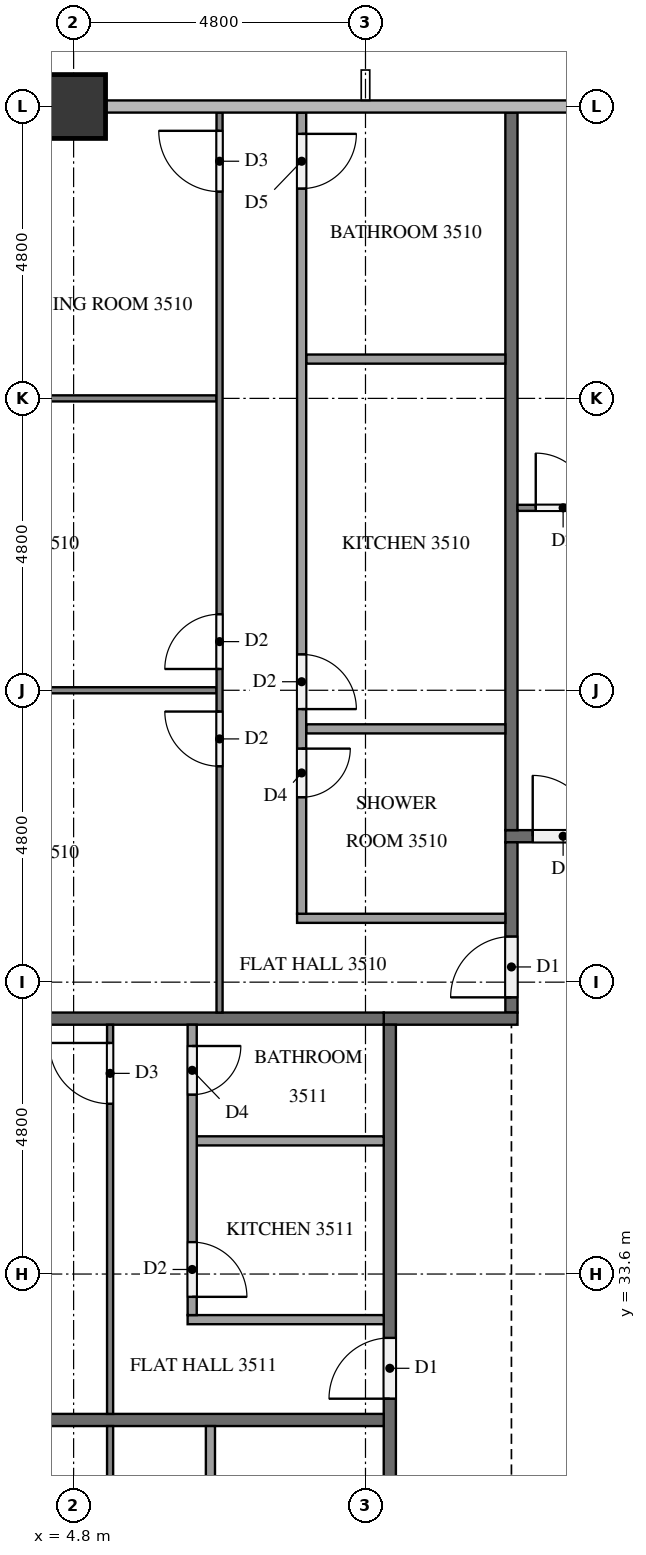
"""IFC4 building model, lengths in metres.
Left out: names, types, materials, properties, quantities, classifications, styles, units other than length and angle.
Written with IfcOpenShell. Run it as: python <this file> out.ifc"""

import sys

from ifc_helpers import new_model, si_unit, direction, frame, frame_2d, origin, origin_2d, place, context, subcontext, project, spatial, rectangle, extrude, element, fill, save


model = new_model("IFC4")
c1 = context("Model", 3, precision=1e-05, world=origin(), true_north=direction((0.0, 1.0)))
c2 = subcontext(c1, "Body", "Model", "MODEL_VIEW")
j1 = project(units=[si_unit("LENGTHUNIT", "METRE"), si_unit("PLANEANGLEUNIT", "RADIAN")], contexts=[c1])
p1 = place(None, origin())
s1 = spatial("IfcSite", under=j1, at=p1, CompositionType="ELEMENT")
p2 = place(p1, origin())
s2 = spatial("IfcBuilding", under=s1, at=p2, CompositionType="ELEMENT")
p3 = place(p2, frame((0.0, 0.0, 136.6)))
s3 = spatial("IfcBuildingStorey", under=s2, at=p3, CompositionType="ELEMENT", Elevation=136.6)
p4 = place(p3, frame((4.8, 52.8, 0.0), z_axis=(0.0, 0.0, 1.0), x_axis=(1.0, 0.0, 0.0)))
e1 = element("IfcColumn", 1, at=p4, inside=s3, PredefinedType="COLUMN", context=c2, shape_type="SweptSolid", body=[
    extrude(rectangle(XDim=1.05, YDim=1.05, at=origin_2d()), origin(), (0.0, 0.0, 1.0), 3.2),
])
p5 = place(p3, frame((11.9, 40.8, 0.0), z_axis=(0.0, 0.0, 1.0), x_axis=(1.0, 0.0, 0.0)))
e2 = element("IfcWall", 2, at=p5, inside=s3, PredefinedType="PARTITIONING", context=c2, shape_type="SweptSolid", body=[
    extrude(rectangle(XDim=38.6, YDim=0.2, at=frame_2d((19.3, 0.0))), origin(), (0.0, 0.0, 1.0), 3.2),
])
p6 = place(p5, frame((37.15, 0.0, 0.0)))
e3 = element("IfcOpeningElement", 3, at=p6, cuts=e2, PredefinedType="OPENING", context=c2, shape_type="SweptSolid", body=[
    extrude(rectangle(XDim=1.0, YDim=2.1, at=frame_2d((0.5, 1.05))), frame((0.0, 0.11, 0.0), z_axis=(0.0, -1.0, 0.0), x_axis=(1.0, 0.0, 0.0)), (0.0, 0.0, 1.0), 0.22),
])
p7 = place(p5, frame((10.05, 0.0, 0.0)))
e4 = element("IfcOpeningElement", 4, at=p7, cuts=e2, PredefinedType="OPENING", context=c2, shape_type="SweptSolid", body=[
    extrude(rectangle(XDim=1.0, YDim=2.1, at=frame_2d((0.5, 1.05))), frame((0.0, 0.11, 0.0), z_axis=(0.0, -1.0, 0.0), x_axis=(1.0, 0.0, 0.0)), (0.0, 0.0, 1.0), 0.22),
])
p8 = place(p5, frame((0.45, 0.0, 0.0)))
e5 = element("IfcOpeningElement", 5, at=p8, cuts=e2, PredefinedType="OPENING", context=c2, shape_type="SweptSolid", body=[
    extrude(rectangle(XDim=1.0, YDim=2.1, at=frame_2d((0.5, 1.05))), frame((0.0, 0.11, 0.0), z_axis=(0.0, -1.0, 0.0), x_axis=(1.0, 0.0, 0.0)), (0.0, 0.0, 1.0), 0.22),
])
p9 = place(p3, frame((12.0, 37.9, 0.0), z_axis=(0.0, 0.0, 1.0), x_axis=(0.0, 1.0, 0.0)))
e6 = element("IfcWall", 6, at=p9, inside=s3, PredefinedType="PARTITIONING", context=c2, shape_type="SweptSolid", body=[
    extrude(rectangle(XDim=2.8, YDim=0.2, at=frame_2d((1.4, 0.0))), origin(), (0.0, 0.0, 1.0), 3.2),
])
p10 = place(p9, frame((0.25, 0.0, 0.0)))
e7 = element("IfcOpeningElement", 7, at=p10, cuts=e6, PredefinedType="OPENING", context=c2, shape_type="SweptSolid", body=[
    extrude(rectangle(XDim=1.0, YDim=2.1, at=frame_2d((0.5, 1.05))), frame((0.0, 0.11, 0.0), z_axis=(0.0, -1.0, 0.0), x_axis=(1.0, 0.0, 0.0)), (0.0, 0.0, 1.0), 0.22),
])
p11 = place(p3, frame((12.1, 37.8, 0.0), z_axis=(0.0, 0.0, 1.0), x_axis=(-1.0, 0.0, 0.0)))
e8 = element("IfcWall", 8, at=p11, inside=s3, PredefinedType="PARTITIONING", context=c2, shape_type="SweptSolid", body=[
    extrude(rectangle(XDim=2.2, YDim=0.2, at=frame_2d((1.1, 0.0))), origin(), (0.0, 0.0, 1.0), 3.2),
])
p12 = place(p3, frame((10.0, 15.1, 0.0), z_axis=(0.0, 0.0, 1.0), x_axis=(0.0, 1.0, 0.0)))
e9 = element("IfcWall", 9, at=p12, inside=s3, PredefinedType="PARTITIONING", context=c2, shape_type="SweptSolid", body=[
    extrude(rectangle(XDim=22.6, YDim=0.2, at=frame_2d((11.3, 0.0))), origin(), (0.0, 0.0, 1.0), 3.2),
])
p13 = place(p12, frame((16.45, 0.0, 0.0)))
e10 = element("IfcOpeningElement", 10, at=p13, cuts=e9, PredefinedType="OPENING", context=c2, shape_type="SweptSolid", body=[
    extrude(rectangle(XDim=1.0, YDim=2.1, at=frame_2d((0.5, 1.05))), frame((0.0, 0.11, 0.0), z_axis=(0.0, -1.0, 0.0), x_axis=(1.0, 0.0, 0.0)), (0.0, 0.0, 1.0), 0.22),
])
p14 = place(p12, frame((0.25, 0.0, 0.0)))
e11 = element("IfcOpeningElement", 11, at=p14, cuts=e9, PredefinedType="OPENING", context=c2, shape_type="SweptSolid", body=[
    extrude(rectangle(XDim=1.0, YDim=2.1, at=frame_2d((0.5, 1.05))), frame((0.0, 0.11, 0.0), z_axis=(0.0, -1.0, 0.0), x_axis=(1.0, 0.0, 0.0)), (0.0, 0.0, 1.0), 0.22),
])
p15 = place(p3, frame((12.0, 52.7, 0.0), z_axis=(0.0, 0.0, 1.0), x_axis=(0.0, -1.0, 0.0)))
e12 = element("IfcWall", 12, at=p15, inside=s3, PredefinedType="PARTITIONING", context=c2, shape_type="SweptSolid", body=[
    extrude(rectangle(XDim=11.8, YDim=0.2, at=frame_2d((5.9, 0.0))), origin(), (0.0, 0.0, 1.0), 3.2),
])
p16 = place(p3, frame((0.375, 37.8, 0.0), z_axis=(0.0, 0.0, 1.0), x_axis=(1.0, 0.0, 0.0)))
e13 = element("IfcWall", 13, at=p16, inside=s3, PredefinedType="PARTITIONING", context=c2, shape_type="SweptSolid", body=[
    extrude(rectangle(XDim=9.525, YDim=0.2, at=frame_2d((4.762, 0.0))), origin(), (0.0, 0.0, 1.0), 3.2),
])
p17 = place(p3, frame((0.1, 31.2, 0.0), z_axis=(0.0, 0.0, 1.0), x_axis=(1.0, 0.0, 0.0)))
e14 = element("IfcWall", 14, at=p17, inside=s3, PredefinedType="PARTITIONING", context=c2, shape_type="SweptSolid", body=[
    extrude(rectangle(XDim=9.8, YDim=0.2, at=frame_2d((4.9, 0.0))), origin(), (0.0, 0.0, 1.0), 3.2),
])
p18 = place(p3, frame((12.1, 46.2, 0.0), z_axis=(0.0, 0.0, 1.0), x_axis=(1.0, 0.0, 0.0)))
e15 = element("IfcWall", 15, at=p18, inside=s3, PredefinedType="PARTITIONING", context=c2, shape_type="SweptSolid", body=[
    extrude(rectangle(XDim=9.4, YDim=0.1, at=frame_2d((4.7, 0.0))), origin(), (0.0, 0.0, 1.0), 3.2),
])
p19 = place(p18, frame((0.3, 0.0, 0.0)))
e16 = element("IfcOpeningElement", 16, at=p19, cuts=e15, PredefinedType="OPENING", context=c2, shape_type="SweptSolid", body=[
    extrude(rectangle(XDim=0.9, YDim=2.1, at=frame_2d((0.45, 1.05))), frame((0.0, 0.06, 0.0), z_axis=(0.0, -1.0, 0.0), x_axis=(1.0, 0.0, 0.0)), (0.0, 0.0, 1.0), 0.12),
])
p20 = place(p18, frame((8.1, 0.0, 0.0)))
e17 = element("IfcOpeningElement", 17, at=p20, cuts=e15, PredefinedType="OPENING", context=c2, shape_type="SweptSolid", body=[
    extrude(rectangle(XDim=1.0, YDim=2.1, at=frame_2d((0.5, 1.05))), frame((0.0, 0.06, 0.0), z_axis=(0.0, -1.0, 0.0), x_axis=(1.0, 0.0, 0.0)), (0.0, 0.0, 1.0), 0.12),
])
p21 = place(p3, frame((7.15, 43.2, 0.0), z_axis=(0.0, 0.0, 1.0), x_axis=(-1.0, 0.0, 0.0)))
e18 = element("IfcWall", 18, at=p21, inside=s3, PredefinedType="PARTITIONING", context=c2, shape_type="SweptSolid", body=[
    extrude(rectangle(XDim=7.05, YDim=0.1, at=frame_2d((3.525, 0.0))), origin(), (0.0, 0.0, 1.0), 3.2),
])
p22 = place(p3, frame((7.15, 48.0, 0.0), z_axis=(0.0, 0.0, 1.0), x_axis=(-1.0, 0.0, 0.0)))
e19 = element("IfcWall", 19, at=p22, inside=s3, PredefinedType="PARTITIONING", context=c2, shape_type="SweptSolid", body=[
    extrude(rectangle(XDim=6.625, YDim=0.1, at=frame_2d((3.312, 0.0))), origin(), (0.0, 0.0, 1.0), 3.2),
])
p23 = place(p3, frame((7.2, 37.9, 0.0), z_axis=(0.0, 0.0, 1.0), x_axis=(0.0, 1.0, 0.0)))
e20 = element("IfcWall", 20, at=p23, inside=s3, PredefinedType="PARTITIONING", context=c2, shape_type="SweptSolid", body=[
    extrude(rectangle(XDim=14.8, YDim=0.1, at=frame_2d((7.4, 0.0))), origin(), (0.0, 0.0, 1.0), 3.2),
])
p24 = place(p23, frame((4.05, 0.0, 0.0)))
e21 = element("IfcOpeningElement", 21, at=p24, cuts=e20, PredefinedType="OPENING", context=c2, shape_type="SweptSolid", body=[
    extrude(rectangle(XDim=0.9, YDim=2.1, at=frame_2d((0.45, 1.05))), frame((0.0, 0.06, 0.0), z_axis=(0.0, -1.0, 0.0), x_axis=(1.0, 0.0, 0.0)), (0.0, 0.0, 1.0), 0.12),
])
p25 = place(p23, frame((5.65, 0.0, 0.0)))
e22 = element("IfcOpeningElement", 22, at=p25, cuts=e20, PredefinedType="OPENING", context=c2, shape_type="SweptSolid", body=[
    extrude(rectangle(XDim=0.9, YDim=2.1, at=frame_2d((0.45, 1.05))), frame((0.0, 0.06, 0.0), z_axis=(0.0, -1.0, 0.0), x_axis=(1.0, 0.0, 0.0)), (0.0, 0.0, 1.0), 0.12),
])
p26 = place(p23, frame((13.5, 0.0, 0.0)))
e23 = element("IfcOpeningElement", 23, at=p26, cuts=e20, PredefinedType="OPENING", context=c2, shape_type="SweptSolid", body=[
    extrude(rectangle(XDim=1.0, YDim=2.1, at=frame_2d((0.5, 1.05))), frame((0.0, 0.06, 0.0), z_axis=(0.0, -1.0, 0.0), x_axis=(1.0, 0.0, 0.0)), (0.0, 0.0, 1.0), 0.12),
])
for number, where, z_axis, x_axis in (
    (24, (11.9, 42.565, 0.0), (0.0, 0.0, 1.0), (-1.0, 0.0, 0.0)),
    (25, (11.9, 48.646, 0.0), (0.0, 0.0, 1.0), (-1.0, 0.0, 0.0)),
):
    element("IfcWall", number, at=place(p3, frame(where, z_axis=z_axis, x_axis=x_axis)), inside=s3, PredefinedType="PARTITIONING", context=c2, shape_type="SweptSolid", body=[
        extrude(rectangle(XDim=3.275, YDim=0.15, at=frame_2d((1.637, 0.0))), origin(), (0.0, 0.0, 1.0), 3.2),
    ])
p27 = place(p3, frame((11.9, 39.45, 0.0), z_axis=(0.0, 0.0, 1.0), x_axis=(-1.0, 0.0, 0.0)))
e26 = element("IfcWall", 26, at=p27, inside=s3, PredefinedType="PARTITIONING", context=c2, shape_type="SweptSolid", body=[
    extrude(rectangle(XDim=3.425, YDim=0.15, at=frame_2d((1.712, 0.0))), origin(), (0.0, 0.0, 1.0), 3.2),
])
p28 = place(p3, frame((8.55, 52.7, 0.0), z_axis=(0.0, 0.0, 1.0), x_axis=(0.0, -1.0, 0.0)))
e27 = element("IfcWall", 27, at=p28, inside=s3, PredefinedType="PARTITIONING", context=c2, shape_type="SweptSolid", body=[
    extrude(rectangle(XDim=13.175, YDim=0.15, at=frame_2d((6.587, 0.0))), origin(), (0.0, 0.0, 1.0), 3.2),
])
p29 = place(p28, frame((10.46, 0.0, 0.0)))
e28 = element("IfcOpeningElement", 28, at=p29, cuts=e27, PredefinedType="OPENING", context=c2, shape_type="SweptSolid", body=[
    extrude(rectangle(XDim=0.8, YDim=2.1, at=frame_2d((0.4, 1.05))), frame((0.0, 0.085, 0.0), z_axis=(0.0, -1.0, 0.0), x_axis=(1.0, 0.0, 0.0)), (0.0, 0.0, 1.0), 0.17),
])
p30 = place(p28, frame((8.91, 0.0, 0.0)))
e29 = element("IfcOpeningElement", 29, at=p30, cuts=e27, PredefinedType="OPENING", context=c2, shape_type="SweptSolid", body=[
    extrude(rectangle(XDim=0.9, YDim=2.1, at=frame_2d((0.45, 1.05))), frame((0.0, 0.085, 0.0), z_axis=(0.0, -1.0, 0.0), x_axis=(1.0, 0.0, 0.0)), (0.0, 0.0, 1.0), 0.17),
])
p31 = place(p28, frame((0.35, 0.0, 0.0)))
e30 = element("IfcOpeningElement", 30, at=p31, cuts=e27, PredefinedType="OPENING", context=c2, shape_type="SweptSolid", body=[
    extrude(rectangle(XDim=0.9, YDim=2.1, at=frame_2d((0.45, 1.05))), frame((0.0, 0.085, 0.0), z_axis=(0.0, -1.0, 0.0), x_axis=(1.0, 0.0, 0.0)), (0.0, 0.0, 1.0), 0.17),
])
p32 = place(p3, frame((5.4, 31.3, 0.0), z_axis=(0.0, 0.0, 1.0), x_axis=(0.0, 1.0, 0.0)))
e31 = element("IfcWall", 31, at=p32, inside=s3, PredefinedType="PARTITIONING", context=c2, shape_type="SweptSolid", body=[
    extrude(rectangle(XDim=6.4, YDim=0.1, at=frame_2d((3.2, 0.0))), origin(), (0.0, 0.0, 1.0), 3.2),
])
p33 = place(p32, frame((5.1, 0.0, 0.0)))
e32 = element("IfcOpeningElement", 32, at=p33, cuts=e31, PredefinedType="OPENING", context=c2, shape_type="SweptSolid", body=[
    extrude(rectangle(XDim=1.0, YDim=2.1, at=frame_2d((0.5, 1.05))), frame((0.0, 0.06, 0.0), z_axis=(0.0, -1.0, 0.0), x_axis=(1.0, 0.0, 0.0)), (0.0, 0.0, 1.0), 0.12),
])
p34 = place(p3, frame((9.9, 35.79, 0.0), z_axis=(0.0, 0.0, 1.0), x_axis=(-1.0, 0.0, 0.0)))
e33 = element("IfcWall", 33, at=p34, inside=s3, PredefinedType="PARTITIONING", context=c2, shape_type="SweptSolid", body=[
    extrude(rectangle(XDim=3.075, YDim=0.15, at=frame_2d((1.538, 0.0))), origin(), (0.0, 0.0, 1.0), 3.2),
])
p35 = place(p3, frame((9.9, 32.85, 0.0), z_axis=(0.0, 0.0, 1.0), x_axis=(-1.0, 0.0, 0.0)))
e34 = element("IfcWall", 34, at=p35, inside=s3, PredefinedType="PARTITIONING", context=c2, shape_type="SweptSolid", body=[
    extrude(rectangle(XDim=3.225, YDim=0.15, at=frame_2d((1.612, 0.0))), origin(), (0.0, 0.0, 1.0), 3.2),
])
p36 = place(p3, frame((6.75, 37.7, 0.0), z_axis=(0.0, 0.0, 1.0), x_axis=(0.0, -1.0, 0.0)))
e35 = element("IfcWall", 35, at=p36, inside=s3, PredefinedType="PARTITIONING", context=c2, shape_type="SweptSolid", body=[
    extrude(rectangle(XDim=4.775, YDim=0.15, at=frame_2d((2.387, 0.0))), origin(), (0.0, 0.0, 1.0), 3.2),
])
p37 = place(p36, frame((3.575, 0.0, 0.0)))
e36 = element("IfcOpeningElement", 36, at=p37, cuts=e35, PredefinedType="OPENING", context=c2, shape_type="SweptSolid", body=[
    extrude(rectangle(XDim=0.9, YDim=2.1, at=frame_2d((0.45, 1.05))), frame((0.0, 0.085, 0.0), z_axis=(0.0, -1.0, 0.0), x_axis=(1.0, 0.0, 0.0)), (0.0, 0.0, 1.0), 0.17),
])
p38 = place(p36, frame((0.35, 0.0, 0.0)))
e37 = element("IfcOpeningElement", 37, at=p38, cuts=e35, PredefinedType="OPENING", context=c2, shape_type="SweptSolid", body=[
    extrude(rectangle(XDim=0.8, YDim=2.1, at=frame_2d((0.4, 1.05))), frame((0.0, 0.085, 0.0), z_axis=(0.0, -1.0, 0.0), x_axis=(1.0, 0.0, 0.0)), (0.0, 0.0, 1.0), 0.17),
])
p39 = place(p3, frame((5.4, 15.1, 0.0), z_axis=(0.0, 0.0, 1.0), x_axis=(0.0, 1.0, 0.0)))
e38 = element("IfcWall", 38, at=p39, inside=s3, PredefinedType="PARTITIONING", context=c2, shape_type="SweptSolid", body=[
    extrude(rectangle(XDim=16.0, YDim=0.1, at=frame_2d((8.0, 0.0))), origin(), (0.0, 0.0, 1.0), 3.2),
])
p40 = place(p39, frame((0.3, 0.0, 0.0)))
e39 = element("IfcOpeningElement", 39, at=p40, cuts=e38, PredefinedType="OPENING", context=c2, shape_type="SweptSolid", body=[
    extrude(rectangle(XDim=1.0, YDim=2.1, at=frame_2d((0.5, 1.05))), frame((0.0, 0.06, 0.0), z_axis=(0.0, -1.0, 0.0), x_axis=(1.0, 0.0, 0.0)), (0.0, 0.0, 1.0), 0.12),
])
p41 = place(p39, frame((10.05, 0.0, 0.0)))
e40 = element("IfcOpeningElement", 40, at=p41, cuts=e38, PredefinedType="OPENING", context=c2, shape_type="SweptSolid", body=[
    extrude(rectangle(XDim=0.9, YDim=2.1, at=frame_2d((0.45, 1.05))), frame((0.0, 0.06, 0.0), z_axis=(0.0, -1.0, 0.0), x_axis=(1.0, 0.0, 0.0)), (0.0, 0.0, 1.0), 0.12),
])
p42 = place(p39, frame((11.65, 0.0, 0.0)))
e41 = element("IfcOpeningElement", 41, at=p42, cuts=e38, PredefinedType="OPENING", context=c2, shape_type="SweptSolid", body=[
    extrude(rectangle(XDim=0.9, YDim=2.1, at=frame_2d((0.45, 1.05))), frame((0.0, 0.06, 0.0), z_axis=(0.0, -1.0, 0.0), x_axis=(1.0, 0.0, 0.0)), (0.0, 0.0, 1.0), 0.12),
])
p43 = place(p3, frame((7.05, 31.1, 0.0), z_axis=(0.0, 0.0, 1.0), x_axis=(0.0, -1.0, 0.0)))
e42 = element("IfcWall", 42, at=p43, inside=s3, PredefinedType="PARTITIONING", context=c2, shape_type="SweptSolid", body=[
    extrude(rectangle(XDim=14.375, YDim=0.15, at=frame_2d((7.188, 0.0))), origin(), (0.0, 0.0, 1.0), 3.2),
])
p44 = place(p43, frame((13.175, 0.0, 0.0)))
e43 = element("IfcOpeningElement", 43, at=p44, cuts=e42, PredefinedType="OPENING", context=c2, shape_type="SweptSolid", body=[
    extrude(rectangle(XDim=0.9, YDim=2.1, at=frame_2d((0.45, 1.05))), frame((0.0, 0.085, 0.0), z_axis=(0.0, -1.0, 0.0), x_axis=(1.0, 0.0, 0.0)), (0.0, 0.0, 1.0), 0.17),
])
p45 = place(p43, frame((3.642, 0.0, 0.0)))
e44 = element("IfcOpeningElement", 44, at=p45, cuts=e42, PredefinedType="OPENING", context=c2, shape_type="SweptSolid", body=[
    extrude(rectangle(XDim=0.9, YDim=2.1, at=frame_2d((0.45, 1.05))), frame((0.0, 0.085, 0.0), z_axis=(0.0, -1.0, 0.0), x_axis=(1.0, 0.0, 0.0)), (0.0, 0.0, 1.0), 0.17),
])
p46 = place(p43, frame((2.192, 0.0, 0.0)))
e45 = element("IfcOpeningElement", 45, at=p46, cuts=e42, PredefinedType="OPENING", context=c2, shape_type="SweptSolid", body=[
    extrude(rectangle(XDim=0.8, YDim=2.1, at=frame_2d((0.4, 1.05))), frame((0.0, 0.085, 0.0), z_axis=(0.0, -1.0, 0.0), x_axis=(1.0, 0.0, 0.0)), (0.0, 0.0, 1.0), 0.17),
])
p47 = place(p8, origin())
e46 = element("IfcDoor", 46, at=p47, inside=s3, OperationType="SINGLE_SWING_LEFT", PredefinedType="DOOR", context=c2, shape_type="SweptSolid", body=[
    extrude(rectangle(XDim=1.0, YDim=2.1, at=frame_2d((0.5, 1.05))), frame((0.0, 0.025, 0.0), z_axis=(0.0, -1.0, 0.0), x_axis=(1.0, 0.0, 0.0)), (0.0, 0.0, 1.0), 0.05),
])
fill(e5, e46)
p48 = place(p10, origin())
e47 = element("IfcDoor", 47, at=p48, inside=s3, OperationType="SINGLE_SWING_LEFT", PredefinedType="DOOR", context=c2, shape_type="SweptSolid", body=[
    extrude(rectangle(XDim=1.0, YDim=2.1, at=frame_2d((0.5, 1.05))), frame((0.0, 0.025, 0.0), z_axis=(0.0, -1.0, 0.0), x_axis=(1.0, 0.0, 0.0)), (0.0, 0.0, 1.0), 0.05),
])
fill(e7, e47)
p49 = place(p13, origin())
e48 = element("IfcDoor", 48, at=p49, inside=s3, OperationType="SINGLE_SWING_LEFT", PredefinedType="DOOR", context=c2, shape_type="SweptSolid", body=[
    extrude(rectangle(XDim=1.0, YDim=2.1, at=frame_2d((0.5, 1.05))), frame((0.0, 0.025, 0.0), z_axis=(0.0, -1.0, 0.0), x_axis=(1.0, 0.0, 0.0)), (0.0, 0.0, 1.0), 0.05),
])
fill(e10, e48)
p50 = place(p19, origin())
e49 = element("IfcDoor", 49, at=p50, inside=s3, OperationType="SINGLE_SWING_LEFT", PredefinedType="DOOR", context=c2, shape_type="SweptSolid", body=[
    extrude(rectangle(XDim=0.9, YDim=2.1, at=frame_2d((0.45, 1.05))), frame((0.0, 0.025, 0.0), z_axis=(0.0, -1.0, 0.0), x_axis=(1.0, 0.0, 0.0)), (0.0, 0.0, 1.0), 0.05),
])
fill(e16, e49)
p51 = place(p24, origin())
e50 = element("IfcDoor", 50, at=p51, inside=s3, OperationType="SINGLE_SWING_RIGHT", PredefinedType="DOOR", context=c2, shape_type="SweptSolid", body=[
    extrude(rectangle(XDim=0.9, YDim=2.1, at=frame_2d((0.45, 1.05))), frame((0.0, 0.025, 0.0), z_axis=(0.0, -1.0, 0.0), x_axis=(1.0, 0.0, 0.0)), (0.0, 0.0, 1.0), 0.05),
])
fill(e21, e50)
p52 = place(p25, origin())
e51 = element("IfcDoor", 51, at=p52, inside=s3, OperationType="SINGLE_SWING_LEFT", PredefinedType="DOOR", context=c2, shape_type="SweptSolid", body=[
    extrude(rectangle(XDim=0.9, YDim=2.1, at=frame_2d((0.45, 1.05))), frame((0.0, 0.025, 0.0), z_axis=(0.0, -1.0, 0.0), x_axis=(1.0, 0.0, 0.0)), (0.0, 0.0, 1.0), 0.05),
])
fill(e22, e51)
p53 = place(p26, origin())
e52 = element("IfcDoor", 52, at=p53, inside=s3, OperationType="SINGLE_SWING_RIGHT", PredefinedType="DOOR", context=c2, shape_type="SweptSolid", body=[
    extrude(rectangle(XDim=1.0, YDim=2.1, at=frame_2d((0.5, 1.05))), frame((0.0, 0.025, 0.0), z_axis=(0.0, -1.0, 0.0), x_axis=(1.0, 0.0, 0.0)), (0.0, 0.0, 1.0), 0.05),
])
fill(e23, e52)
p54 = place(p29, origin())
e53 = element("IfcDoor", 53, at=p54, inside=s3, OperationType="SINGLE_SWING_LEFT", PredefinedType="DOOR", context=c2, shape_type="SweptSolid", body=[
    extrude(rectangle(XDim=0.8, YDim=2.1, at=frame_2d((0.4, 1.05))), frame((0.0, 0.025, 0.0), z_axis=(0.0, -1.0, 0.0), x_axis=(1.0, 0.0, 0.0)), (0.0, 0.0, 1.0), 0.05),
])
fill(e28, e53)
p55 = place(p30, origin())
e54 = element("IfcDoor", 54, at=p55, inside=s3, OperationType="SINGLE_SWING_RIGHT", PredefinedType="DOOR", context=c2, shape_type="SweptSolid", body=[
    extrude(rectangle(XDim=0.9, YDim=2.1, at=frame_2d((0.45, 1.05))), frame((0.0, 0.025, 0.0), z_axis=(0.0, -1.0, 0.0), x_axis=(1.0, 0.0, 0.0)), (0.0, 0.0, 1.0), 0.05),
])
fill(e29, e54)
p56 = place(p31, origin())
e55 = element("IfcDoor", 55, at=p56, inside=s3, OperationType="SINGLE_SWING_LEFT", PredefinedType="DOOR", context=c2, shape_type="SweptSolid", body=[
    extrude(rectangle(XDim=0.9, YDim=2.1, at=frame_2d((0.45, 1.05))), frame((0.0, 0.025, 0.0), z_axis=(0.0, -1.0, 0.0), x_axis=(1.0, 0.0, 0.0)), (0.0, 0.0, 1.0), 0.05),
])
fill(e30, e55)
p57 = place(p33, origin())
e56 = element("IfcDoor", 56, at=p57, inside=s3, OperationType="SINGLE_SWING_RIGHT", PredefinedType="DOOR", context=c2, shape_type="SweptSolid", body=[
    extrude(rectangle(XDim=1.0, YDim=2.1, at=frame_2d((0.5, 1.05))), frame((0.0, 0.025, 0.0), z_axis=(0.0, -1.0, 0.0), x_axis=(1.0, 0.0, 0.0)), (0.0, 0.0, 1.0), 0.05),
])
fill(e32, e56)
p58 = place(p37, origin())
e57 = element("IfcDoor", 57, at=p58, inside=s3, OperationType="SINGLE_SWING_RIGHT", PredefinedType="DOOR", context=c2, shape_type="SweptSolid", body=[
    extrude(rectangle(XDim=0.9, YDim=2.1, at=frame_2d((0.45, 1.05))), frame((0.0, 0.025, 0.0), z_axis=(0.0, -1.0, 0.0), x_axis=(1.0, 0.0, 0.0)), (0.0, 0.0, 1.0), 0.05),
])
fill(e36, e57)
p59 = place(p38, origin())
e58 = element("IfcDoor", 58, at=p59, inside=s3, OperationType="SINGLE_SWING_LEFT", PredefinedType="DOOR", context=c2, shape_type="SweptSolid", body=[
    extrude(rectangle(XDim=0.8, YDim=2.1, at=frame_2d((0.4, 1.05))), frame((0.0, 0.025, 0.0), z_axis=(0.0, -1.0, 0.0), x_axis=(1.0, 0.0, 0.0)), (0.0, 0.0, 1.0), 0.05),
])
fill(e37, e58)
save(model, sys.argv[1])
